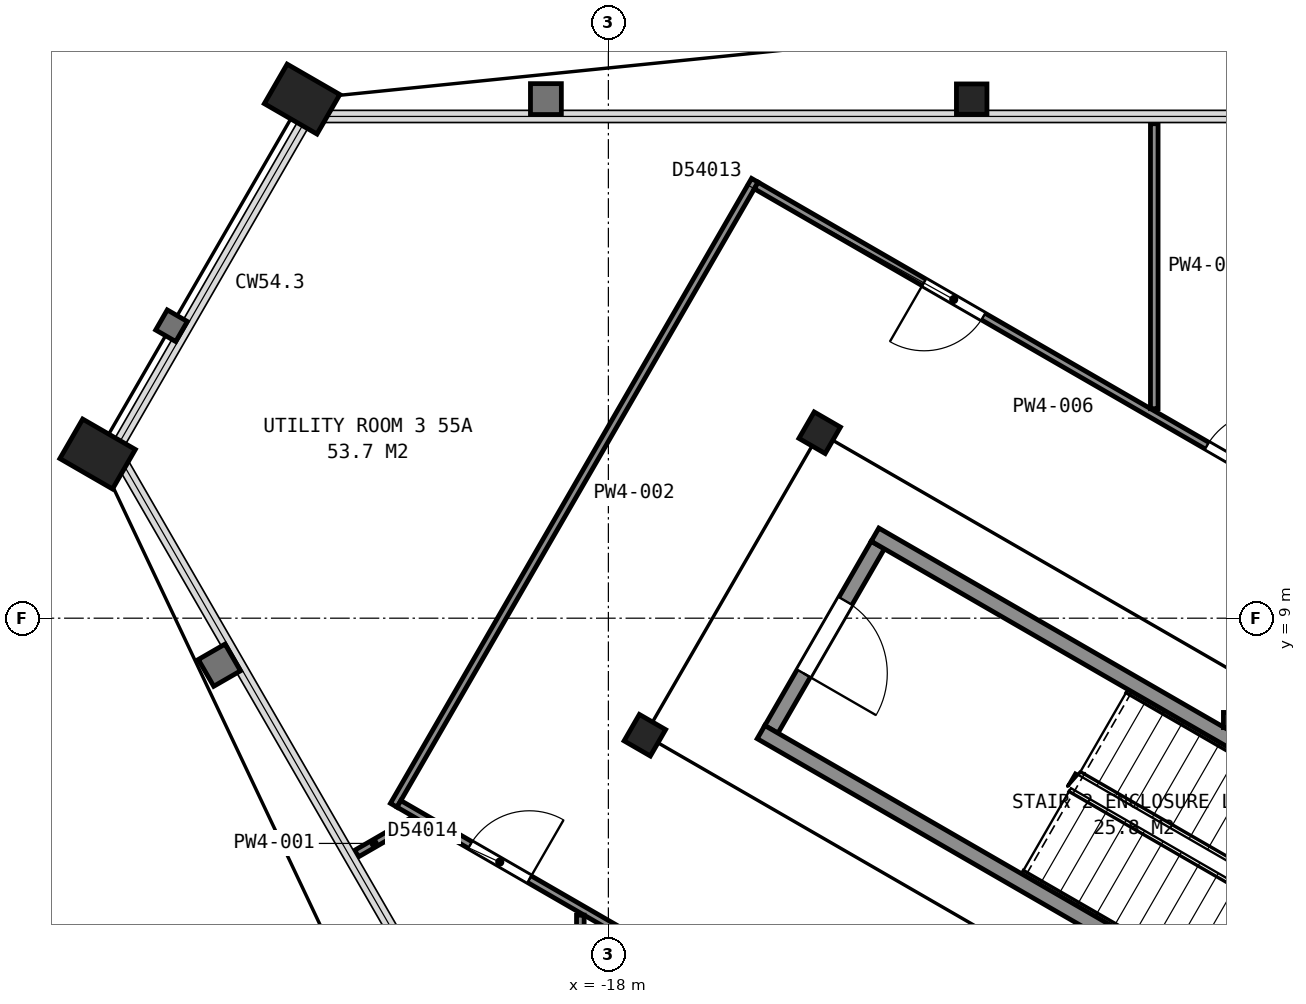
"""IFC4 building model, lengths in metres.
Left out: names, types, materials, properties, quantities, classifications, styles, units other than length and angle.
Written with IfcOpenShell. Run it as: python <this file> out.ifc"""

import sys

from ifc_helpers import new_model, si_unit, direction, frame, frame_2d, origin, origin_2d, place, context, subcontext, project, spatial, rectangle, hollow_rectangle, i_section, extrude, element, fill, save


model = new_model("IFC4")
c1 = context("Model", 3, precision=1e-05, world=origin(), true_north=direction((0.0, 1.0)))
c2 = subcontext(c1, "Body", "Model", "MODEL_VIEW")
j1 = project(units=[si_unit("LENGTHUNIT", "METRE"), si_unit("PLANEANGLEUNIT", "RADIAN")], contexts=[c1])
p1 = place(None, origin())
s1 = spatial("IfcSite", under=j1, at=p1, CompositionType="ELEMENT")
p2 = place(p1, origin())
s2 = spatial("IfcBuilding", under=s1, at=p2, CompositionType="ELEMENT")
p3 = place(p2, frame((0.0, 0.0, 221.2)))
s3 = spatial("IfcBuildingStorey", under=s2, at=p3, CompositionType="ELEMENT", Elevation=221.2)
p4 = place(p3, frame((-13.22, 15.83, 0.0), z_axis=(0.0, 0.0, 1.0), x_axis=(1.0, 0.0, 0.0)))
e1 = element("IfcColumn", 1, at=p4, inside=s3, PredefinedType="COLUMN", context=c2, shape_type="SweptSolid", body=[
    extrude(i_section(OverallWidth=0.401, OverallDepth=0.399, WebThickness=0.025, FlangeThickness=0.04, FilletRadius=0.015, at=origin_2d()), origin(), (0.0, 0.0, 1.0), 3.7),
])
for number, where, z_axis, x_axis in (
    (2, (-22.03, 15.83, 0.0), (0.0, 0.0, 1.0), (0.5, 0.866, 0.0)),
    (3, (-24.72, 11.16, 0.0), (0.0, 0.0, 1.0), (0.5, 0.866, 0.0)),
):
    element("IfcColumn", number, at=place(p3, frame(where, z_axis=z_axis, x_axis=x_axis)), inside=s3, PredefinedType="COLUMN", context=c2, shape_type="SweptSolid", body=[
        extrude(hollow_rectangle(XDim=0.6, YDim=0.8, WallThickness=0.05, at=origin_2d()), origin(), (0.0, 0.0, 1.0), 3.7),
    ])
for number, where, z_axis, x_axis in (
    (4, (-15.22, 11.44, 0.0), (0.0, 0.0, 1.0), (0.5, 0.866, 0.0)),
    (5, (-17.52, 7.46, 0.0), (0.0, 0.0, 1.0), (0.5, 0.866, 0.0)),
):
    element("IfcColumn", number, at=place(p3, frame(where, z_axis=z_axis, x_axis=x_axis)), inside=s3, PredefinedType="COLUMN", context=c2, shape_type="SweptSolid", body=[
        extrude(i_section(OverallWidth=0.401, OverallDepth=0.399, WebThickness=0.025, FlangeThickness=0.04, FilletRadius=0.015, at=origin_2d()), origin(), (0.0, 0.0, 1.0), 3.7),
    ])
p5 = place(p3, frame((-14.455, 9.962, 0.0), z_axis=(0.0, 0.0, 1.0), x_axis=(-0.500049511043, -0.865996816683, 0.0)))
e6 = element("IfcWall", 6, at=p5, inside=s3, PredefinedType="PARTITIONING", context=c2, shape_type="SweptSolid", body=[
    extrude(rectangle(XDim=2.8, YDim=0.2, at=frame_2d((1.4, 0.0))), origin(), (0.0, 0.0, 1.0), 3.45),
])
p6 = place(p5, frame((0.85, 0.0, 0.0)))
e7 = element("IfcOpeningElement", 7, at=p6, cuts=e6, PredefinedType="OPENING", context=c2, shape_type="SweptSolid", body=[
    extrude(rectangle(XDim=1.1, YDim=2.1, at=frame_2d((0.55, 1.05))), frame((0.0, 0.11, 0.0), z_axis=(0.0, -1.0, 0.0), x_axis=(1.0, 0.0, 0.0)), (0.0, 0.0, 1.0), 0.22),
])
for number, where, z_axis, x_axis in (
    (8, (-7.678, 2.701, 0.0), (0.0, 0.0, 1.0), (-0.866, 0.5, 0.0)),
    (9, (-6.178, 5.299, 0.0), (0.0, 0.0, 1.0), (-0.866, 0.5, 0.0)),
):
    element("IfcWall", number, at=place(p3, frame(where, z_axis=z_axis, x_axis=x_axis)), inside=s3, PredefinedType="PARTITIONING", context=c2, shape_type="SweptSolid", body=[
        extrude(rectangle(XDim=9.6, YDim=0.2, at=frame_2d((4.8, 0.0))), origin(), (0.0, 0.0, 1.0), 3.45),
    ])
p7 = place(p3, frame((-9.908, 7.66, 0.0), z_axis=(0.0, 0.0, 1.0), x_axis=(1.0, 0.0, 0.0)))
e10 = element("IfcWall", 10, at=p7, inside=s3, PredefinedType="PARTITIONING", context=c2, shape_type="SweptSolid", body=[
    extrude(rectangle(XDim=3.621, YDim=0.2, at=frame_2d((1.811, 0.0))), origin(), (0.0, 0.0, 1.0), 3.45),
])
p8 = place(p3, frame((-21.313, 5.903, 0.0), z_axis=(0.0, 0.0, 1.0), x_axis=(0.865952303503, 0.500126592033, 0.0)))
e11 = element("IfcWall", 11, at=p8, inside=s3, PredefinedType="PARTITIONING", context=c2, shape_type="SweptSolid", body=[
    extrude(rectangle(XDim=0.889, YDim=0.1, at=frame_2d((0.444, 0.0))), origin(), (0.0, 0.0, 1.0), 2.713),
])
p9 = place(p3, frame((-20.824, 6.539, 0.0), z_axis=(0.0, 0.0, 1.0), x_axis=(0.500297300687, 0.865853689098, 0.0)))
e12 = element("IfcWall", 12, at=p9, inside=s3, PredefinedType="PARTITIONING", context=c2, shape_type="SweptSolid", body=[
    extrude(rectangle(XDim=9.496, YDim=0.1, at=frame_2d((4.748, 0.0))), origin(), (0.0, 0.0, 1.0), 2.713),
])
p10 = place(p3, frame((-13.391, 2.305, 0.0), z_axis=(0.0, 0.0, 1.0), x_axis=(-0.86606177021, 0.499937006213, 0.0)))
e13 = element("IfcWall", 13, at=p10, inside=s3, PredefinedType="PARTITIONING", context=c2, shape_type="SweptSolid", body=[
    extrude(rectangle(XDim=8.504, YDim=0.1, at=frame_2d((4.252, 0.0))), origin(), (0.0, 0.0, 1.0), 2.713),
])
p11 = place(p10, frame((6.522, 0.0, 0.0)))
e14 = element("IfcOpeningElement", 14, at=p11, cuts=e13, PredefinedType="OPENING", context=c2, shape_type="SweptSolid", body=[
    extrude(rectangle(XDim=0.9, YDim=2.1, at=frame_2d((0.45, 1.05))), frame((0.0, 0.06, 0.0), z_axis=(0.0, -1.0, 0.0), x_axis=(1.0, 0.0, 0.0)), (0.0, 0.0, 1.0), 0.12),
])
p12 = place(p3, frame((-18.369, 2.678, 0.0), z_axis=(0.0, 0.0, 1.0), x_axis=(0.0, 1.0, 0.0)))
e15 = element("IfcWall", 15, at=p12, inside=s3, PredefinedType="PARTITIONING", context=c2, shape_type="SweptSolid", body=[
    extrude(rectangle(XDim=2.414, YDim=0.1, at=frame_2d((1.207, 0.0))), origin(), (0.0, 0.0, 1.0), 2.713),
])
p13 = place(p3, frame((-16.055, 14.693, 0.0), z_axis=(0.0, 0.0, 1.0), x_axis=(0.866070360466, -0.499922124658, 0.0)))
e16 = element("IfcWall", 16, at=p13, inside=s3, PredefinedType="PARTITIONING", context=c2, shape_type="SweptSolid", body=[
    extrude(rectangle(XDim=8.503, YDim=0.1, at=frame_2d((4.251, 0.0))), origin(), (0.0, 0.0, 1.0), 2.713),
])
p14 = place(p13, frame((6.847, 0.0, 0.0)))
e17 = element("IfcOpeningElement", 17, at=p14, cuts=e16, PredefinedType="OPENING", context=c2, shape_type="SweptSolid", body=[
    extrude(rectangle(XDim=0.9, YDim=2.1, at=frame_2d((0.45, 1.05))), frame((0.0, 0.06, 0.0), z_axis=(0.0, -1.0, 0.0), x_axis=(1.0, 0.0, 0.0)), (0.0, 0.0, 1.0), 0.12),
])
p15 = place(p13, frame((2.55, 0.0, 0.0)))
e18 = element("IfcOpeningElement", 18, at=p15, cuts=e16, PredefinedType="OPENING", context=c2, shape_type="SweptSolid", body=[
    extrude(rectangle(XDim=0.9, YDim=2.1, at=frame_2d((0.45, 1.05))), frame((0.0, 0.06, 0.0), z_axis=(0.0, -1.0, 0.0), x_axis=(1.0, 0.0, 0.0)), (0.0, 0.0, 1.0), 0.12),
])
p16 = place(p3, frame((-10.818, 11.757, 0.0), z_axis=(0.0, 0.0, 1.0), x_axis=(0.0, 1.0, 0.0)))
e19 = element("IfcWall", 19, at=p16, inside=s3, PredefinedType="PARTITIONING", context=c2, shape_type="SweptSolid", body=[
    extrude(rectangle(XDim=3.75, YDim=0.1, at=frame_2d((1.875, 0.0))), origin(), (0.0, 0.0, 1.0), 2.713),
])
p17 = place(p6, origin())
e20 = element("IfcDoor", 20, at=p17, inside=s3, OperationType="SINGLE_SWING_RIGHT", PredefinedType="DOOR", context=c2, shape_type="SweptSolid", body=[
    extrude(rectangle(XDim=1.1, YDim=2.1, at=frame_2d((0.55, 1.05))), frame((0.0, 0.025, 0.0), z_axis=(0.0, -1.0, 0.0), x_axis=(1.0, 0.0, 0.0)), (0.0, 0.0, 1.0), 0.05),
])
fill(e7, e20)
p18 = place(p11, origin())
e21 = element("IfcDoor", 21, at=p18, inside=s3, OperationType="SINGLE_SWING_LEFT", PredefinedType="DOOR", context=c2, shape_type="SweptSolid", body=[
    extrude(rectangle(XDim=0.9, YDim=2.1, at=frame_2d((0.45, 1.05))), frame((0.0, 0.025, 0.0), z_axis=(0.0, -1.0, 0.0), x_axis=(1.0, 0.0, 0.0)), (0.0, 0.0, 1.0), 0.05),
])
fill(e14, e21)
p19 = place(p14, origin())
e22 = element("IfcDoor", 22, at=p19, inside=s3, OperationType="SINGLE_SWING_RIGHT", PredefinedType="DOOR", context=c2, shape_type="SweptSolid", body=[
    extrude(rectangle(XDim=0.9, YDim=2.1, at=frame_2d((0.45, 1.05))), frame((0.0, 0.025, 0.0), z_axis=(0.0, -1.0, 0.0), x_axis=(1.0, 0.0, 0.0)), (0.0, 0.0, 1.0), 0.05),
])
fill(e17, e22)
p20 = place(p15, origin())
e23 = element("IfcDoor", 23, at=p20, inside=s3, OperationType="SINGLE_SWING_LEFT", PredefinedType="DOOR", context=c2, shape_type="SweptSolid", body=[
    extrude(rectangle(XDim=0.9, YDim=2.1, at=frame_2d((0.45, 1.05))), frame((0.0, 0.025, 0.0), z_axis=(0.0, -1.0, 0.0), x_axis=(1.0, 0.0, 0.0)), (0.0, 0.0, 1.0), 0.05),
])
fill(e18, e23)
save(model, sys.argv[1])
